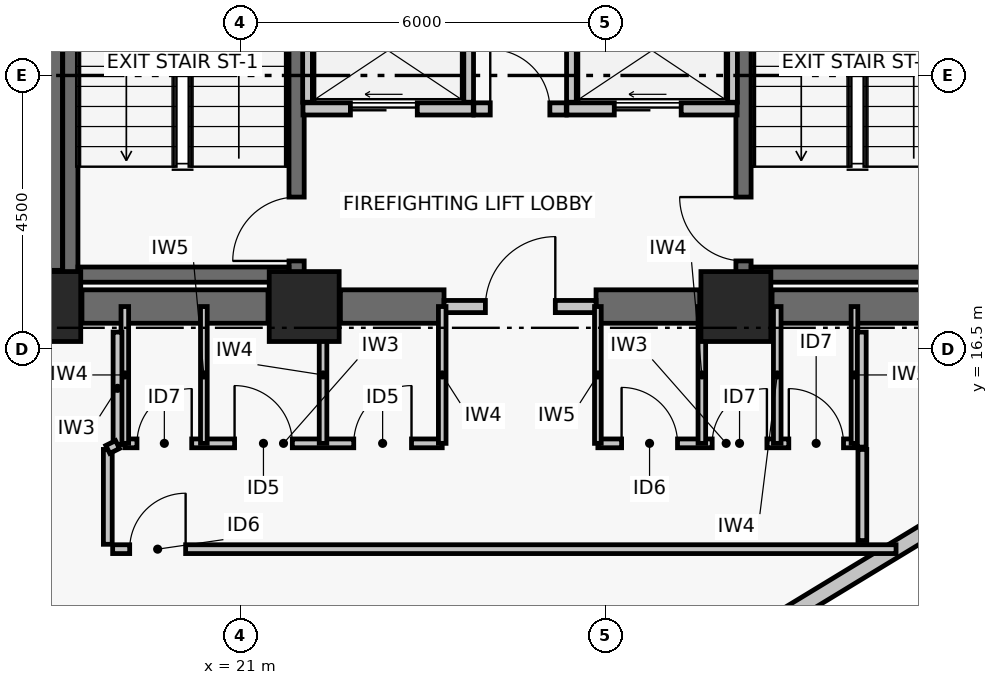
"""IFC4 building model, lengths in metres.
Left out: names, types, materials, properties, quantities, classifications, styles, units other than length and angle.
Written with IfcOpenShell. Run it as: python <this file> out.ifc"""

import sys

from ifc_helpers import new_model, si_unit, direction, frame, frame_2d, origin, origin_2d, place, context, subcontext, project, spatial, rectangle, extrude, element, fill, save


model = new_model("IFC4")
c1 = context("Model", 3, precision=1e-05, world=origin(), true_north=direction((0.0, 1.0)))
c2 = subcontext(c1, "Body", "Model", "MODEL_VIEW")
j1 = project(units=[si_unit("LENGTHUNIT", "METRE"), si_unit("PLANEANGLEUNIT", "RADIAN")], contexts=[c1])
p1 = place(None, origin())
s1 = spatial("IfcSite", under=j1, at=p1, CompositionType="ELEMENT")
p2 = place(p1, origin())
s2 = spatial("IfcBuilding", under=s1, at=p2, CompositionType="ELEMENT")
p3 = place(p2, frame((0.0, 0.0, 103.98)))
s3 = spatial("IfcBuildingStorey", under=s2, at=p3, CompositionType="ELEMENT", Elevation=103.98)
for number, where, z_axis, x_axis in (
    (1, (17.8, 17.2, 0.0), (0.0, 0.0, 1.0), (1.0, 0.0, 0.0)),
    (2, (22.05, 17.2, 0.0), (0.0, 0.0, 1.0), (1.0, 0.0, 0.0)),
    (3, (29.15, 17.2, 0.0), (0.0, 0.0, 1.0), (1.0, 0.0, 0.0)),
):
    element("IfcColumn", number, at=place(p3, frame(where, z_axis=z_axis, x_axis=x_axis)), inside=s3, PredefinedType="COLUMN", context=c2, shape_type="SweptSolid", body=[
        extrude(rectangle(XDim=1.15, YDim=1.15, at=origin_2d()), origin(), (0.0, 0.0, 1.0), 3.72),
    ])
p4 = place(p3, frame((18.395, 17.2, 0.0), z_axis=(0.0, 0.0, 1.0), x_axis=(1.0, 0.0, 0.0)))
e4 = element("IfcWall", 4, at=p4, inside=s3, PredefinedType="SHEAR", context=c2, shape_type="SweptSolid", body=[
    extrude(rectangle(XDim=3.06, YDim=0.55, at=frame_2d((1.53, 0.0))), origin(), (0.0, 0.0, 1.0), 3.47),
])
p5 = place(p3, frame((22.645, 17.2, 0.0), z_axis=(0.0, 0.0, 1.0), x_axis=(1.0, 0.0, 0.0)))
e5 = element("IfcWall", 5, at=p5, inside=s3, PredefinedType="SHEAR", context=c2, shape_type="SweptSolid", body=[
    extrude(rectangle(XDim=1.705, YDim=0.55, at=frame_2d((0.853, 0.0))), origin(), (0.0, 0.0, 1.0), 3.47),
])
p6 = place(p3, frame((26.85, 17.2, 0.0), z_axis=(0.0, 0.0, 1.0), x_axis=(1.0, 0.0, 0.0)))
e6 = element("IfcWall", 6, at=p6, inside=s3, PredefinedType="SHEAR", context=c2, shape_type="SweptSolid", body=[
    extrude(rectangle(XDim=1.705, YDim=0.55, at=frame_2d((0.853, 0.0))), origin(), (0.0, 0.0, 1.0), 3.47),
])
p7 = place(p3, frame((29.745, 17.2, 0.0), z_axis=(0.0, 0.0, 1.0), x_axis=(1.0, 0.0, 0.0)))
e7 = element("IfcWall", 7, at=p7, inside=s3, PredefinedType="SHEAR", context=c2, shape_type="SweptSolid", body=[
    extrude(rectangle(XDim=3.06, YDim=0.55, at=frame_2d((1.53, 0.0))), origin(), (0.0, 0.0, 1.0), 3.47),
])
p8 = place(p3, frame((17.8, 17.795, 0.0), z_axis=(0.0, 0.0, 1.0), x_axis=(0.0, 1.0, 0.0)))
e8 = element("IfcWall", 8, at=p8, inside=s3, PredefinedType="SHEAR", context=c2, shape_type="SweptSolid", body=[
    extrude(rectangle(XDim=8.41, YDim=0.55, at=frame_2d((4.205, 0.0))), origin(), (0.0, 0.0, 1.0), 3.47),
])
p9 = place(p3, frame((18.204, 17.6, 0.0), z_axis=(0.0, 0.0, 1.0), x_axis=(0.0, 1.0, 0.0)))
e9 = element("IfcWall", 9, at=p9, inside=s3, PredefinedType="SHEAR", context=c2, shape_type="SweptSolid", body=[
    extrude(rectangle(XDim=8.8, YDim=0.25, at=frame_2d((4.4, 0.0))), origin(), (0.0, 0.0, 1.0), 3.47),
])
p10 = place(p3, frame((21.925, 17.6, 0.0), z_axis=(0.0, 0.0, 1.0), x_axis=(0.0, 1.0, 0.0)))
e10 = element("IfcWall", 10, at=p10, inside=s3, PredefinedType="SHEAR", context=c2, shape_type="SweptSolid", body=[
    extrude(rectangle(XDim=8.8, YDim=0.25, at=frame_2d((4.4, 0.0))), origin(), (0.0, 0.0, 1.0), 3.47),
])
p11 = place(p10, frame((0.35, 0.0, 0.0)))
e11 = element("IfcOpeningElement", 11, at=p11, cuts=e10, PredefinedType="OPENING", context=c2, shape_type="SweptSolid", body=[
    extrude(rectangle(XDim=1.05, YDim=2.08, at=frame_2d((0.525, 1.04))), frame((0.0, 0.135, 0.0), z_axis=(0.0, -1.0, 0.0), x_axis=(1.0, 0.0, 0.0)), (0.0, 0.0, 1.0), 0.27),
])
p12 = place(p3, frame((18.329, 17.725, 0.0), z_axis=(0.0, 0.0, 1.0), x_axis=(1.0, 0.0, 0.0)))
e12 = element("IfcWall", 12, at=p12, inside=s3, PredefinedType="SHEAR", context=c2, shape_type="SweptSolid", body=[
    extrude(rectangle(XDim=3.471, YDim=0.25, at=frame_2d((1.735, 0.0))), origin(), (0.0, 0.0, 1.0), 3.47),
])
p13 = place(p3, frame((29.275, 17.6, 0.0), z_axis=(0.0, 0.0, 1.0), x_axis=(0.0, 1.0, 0.0)))
e13 = element("IfcWall", 13, at=p13, inside=s3, PredefinedType="SHEAR", context=c2, shape_type="SweptSolid", body=[
    extrude(rectangle(XDim=8.8, YDim=0.25, at=frame_2d((4.4, 0.0))), origin(), (0.0, 0.0, 1.0), 3.47),
])
p14 = place(p13, frame((0.35, 0.0, 0.0)))
e14 = element("IfcOpeningElement", 14, at=p14, cuts=e13, PredefinedType="OPENING", context=c2, shape_type="SweptSolid", body=[
    extrude(rectangle(XDim=1.05, YDim=2.08, at=frame_2d((0.525, 1.04))), frame((0.0, 0.135, 0.0), z_axis=(0.0, -1.0, 0.0), x_axis=(1.0, 0.0, 0.0)), (0.0, 0.0, 1.0), 0.27),
])
p15 = place(p3, frame((29.4, 17.725, 0.0), z_axis=(0.0, 0.0, 1.0), x_axis=(1.0, 0.0, 0.0)))
e15 = element("IfcWall", 15, at=p15, inside=s3, PredefinedType="SHEAR", context=c2, shape_type="SweptSolid", body=[
    extrude(rectangle(XDim=3.471, YDim=0.25, at=frame_2d((1.736, 0.0))), origin(), (0.0, 0.0, 1.0), 3.47),
])
p16 = place(p3, frame((35.48, 15.455, 0.0), z_axis=(0.0, 0.0, 1.0), x_axis=(-0.854673977685, -0.51916509115, 0.0)))
e16 = element("IfcWall", 16, at=p16, inside=s3, PredefinedType="PARTITIONING", context=c2, shape_type="SweptSolid", body=[
    extrude(rectangle(XDim=6.678, YDim=0.26, at=frame_2d((3.339, 0.0))), origin(), (0.0, 0.0, 1.0), 3.47),
])
p17 = place(p3, frame((24.35, 17.2, 0.0), z_axis=(0.0, 0.0, 1.0), x_axis=(1.0, 0.0, 0.0)))
e17 = element("IfcWall", 17, at=p17, inside=s3, PredefinedType="PARTITIONING", context=c2, shape_type="SweptSolid", body=[
    extrude(rectangle(XDim=2.5, YDim=0.2, at=frame_2d((1.25, 0.0))), origin(), (0.0, 0.0, 1.0), 2.6),
])
p18 = place(p17, frame((0.68, 0.0, 0.0)))
e18 = element("IfcOpeningElement", 18, at=p18, cuts=e17, PredefinedType="OPENING", context=c2, shape_type="SweptSolid", body=[
    extrude(rectangle(XDim=1.15, YDim=2.08, at=frame_2d((0.575, 1.04))), frame((0.0, 0.11, 0.0), z_axis=(0.0, -1.0, 0.0), x_axis=(1.0, 0.0, 0.0)), (0.0, 0.0, 1.0), 0.22),
])
p19 = place(p3, frame((24.84, 20.45, 0.0), z_axis=(0.0, 0.0, 1.0), x_axis=(1.0, 0.0, 0.0)))
e19 = element("IfcWall", 19, at=p19, inside=s3, PredefinedType="PARTITIONING", context=c2, shape_type="SweptSolid", body=[
    extrude(rectangle(XDim=1.52, YDim=0.2, at=frame_2d((0.76, 0.0))), origin(), (0.0, 0.0, 1.0), 3.47),
])
p20 = place(p19, frame((0.27, 0.0, 0.0)))
e20 = element("IfcOpeningElement", 20, at=p20, cuts=e19, PredefinedType="OPENING", context=c2, shape_type="SweptSolid", body=[
    extrude(rectangle(XDim=0.98, YDim=2.06, at=frame_2d((0.49, 1.03))), frame((0.0, 0.11, 0.0), z_axis=(0.0, -1.0, 0.0), x_axis=(1.0, 0.0, 0.0)), (0.0, 0.0, 1.0), 0.22),
])
p21 = place(p3, frame((22.03, 20.45, 0.0), z_axis=(0.0, 0.0, 1.0), x_axis=(1.0, 0.0, 0.0)))
e21 = element("IfcWall", 21, at=p21, inside=s3, PredefinedType="PARTITIONING", context=c2, shape_type="SweptSolid", body=[
    extrude(rectangle(XDim=2.8, YDim=0.2, at=frame_2d((1.4, 0.0))), origin(), (0.0, 0.0, 1.0), 3.47),
])
p22 = place(p21, frame((0.78, 0.0, 0.0)))
e22 = element("IfcOpeningElement", 22, at=p22, cuts=e21, PredefinedType="OPENING", context=c2, shape_type="SweptSolid", body=[
    extrude(rectangle(XDim=1.1, YDim=2.08, at=frame_2d((0.55, 1.04))), frame((0.0, 0.11, 0.0), z_axis=(0.0, -1.0, 0.0), x_axis=(1.0, 0.0, 0.0)), (0.0, 0.0, 1.0), 0.22),
])
p23 = place(p3, frame((26.37, 20.45, 0.0), z_axis=(0.0, 0.0, 1.0), x_axis=(1.0, 0.0, 0.0)))
e23 = element("IfcWall", 23, at=p23, inside=s3, PredefinedType="PARTITIONING", context=c2, shape_type="SweptSolid", body=[
    extrude(rectangle(XDim=2.8, YDim=0.2, at=frame_2d((1.4, 0.0))), origin(), (0.0, 0.0, 1.0), 3.47),
])
p24 = place(p23, frame((0.78, 0.0, 0.0)))
e24 = element("IfcOpeningElement", 24, at=p24, cuts=e23, PredefinedType="OPENING", context=c2, shape_type="SweptSolid", body=[
    extrude(rectangle(XDim=1.1, YDim=2.08, at=frame_2d((0.55, 1.04))), frame((0.0, 0.11, 0.0), z_axis=(0.0, -1.0, 0.0), x_axis=(1.0, 0.0, 0.0)), (0.0, 0.0, 1.0), 0.22),
])
p25 = place(p3, frame((22.105, 20.56, 0.0), z_axis=(0.0, 0.0, 1.0), x_axis=(0.0, 1.0, 0.0)))
e25 = element("IfcWall", 25, at=p25, inside=s3, PredefinedType="PARTITIONING", context=c2, shape_type="SweptSolid", body=[
    extrude(rectangle(XDim=5.45, YDim=0.16, at=frame_2d((2.725, 0.0))), origin(), (0.0, 0.0, 1.0), 3.47),
])
p26 = place(p3, frame((24.755, 20.56, 0.0), z_axis=(0.0, 0.0, 1.0), x_axis=(0.0, 1.0, 0.0)))
e26 = element("IfcWall", 26, at=p26, inside=s3, PredefinedType="PARTITIONING", context=c2, shape_type="SweptSolid", body=[
    extrude(rectangle(XDim=1.71, YDim=0.16, at=frame_2d((0.855, 0.0))), origin(), (0.0, 0.0, 1.0), 3.47),
])
p27 = place(p3, frame((29.095, 20.56, 0.0), z_axis=(0.0, 0.0, 1.0), x_axis=(0.0, 1.0, 0.0)))
e27 = element("IfcWall", 27, at=p27, inside=s3, PredefinedType="PARTITIONING", context=c2, shape_type="SweptSolid", body=[
    extrude(rectangle(XDim=5.45, YDim=0.16, at=frame_2d((2.725, 0.0))), origin(), (0.0, 0.0, 1.0), 3.47),
])
p28 = place(p3, frame((26.445, 20.56, 0.0), z_axis=(0.0, 0.0, 1.0), x_axis=(0.0, 1.0, 0.0)))
e28 = element("IfcWall", 28, at=p28, inside=s3, PredefinedType="PARTITIONING", context=c2, shape_type="SweptSolid", body=[
    extrude(rectangle(XDim=1.71, YDim=0.16, at=frame_2d((0.855, 0.0))), origin(), (0.0, 0.0, 1.0), 3.47),
])
p29 = place(p3, frame((19.1, 14.95, 0.0), z_axis=(0.0, 0.0, 1.0), x_axis=(1.0, 0.0, 0.0)))
e29 = element("IfcWall", 29, at=p29, inside=s3, PredefinedType="PARTITIONING", context=c2, shape_type="SweptSolid", body=[
    extrude(rectangle(XDim=5.22, YDim=0.145, at=frame_2d((2.61, 0.0))), origin(), (0.0, 0.0, 1.0), 2.65),
])
p30 = place(p29, frame((0.2, 0.0, 0.0)))
e30 = element("IfcOpeningElement", 30, at=p30, cuts=e29, PredefinedType="OPENING", context=c2, shape_type="SweptSolid", body=[
    extrude(rectangle(XDim=0.9, YDim=2.02, at=frame_2d((0.45, 1.01))), frame((0.0, 0.083, 0.0), z_axis=(0.0, -1.0, 0.0), x_axis=(1.0, 0.0, 0.0)), (0.0, 0.0, 1.0), 0.165),
])
p31 = place(p29, frame((1.805, 0.0, 0.0)))
e31 = element("IfcOpeningElement", 31, at=p31, cuts=e29, PredefinedType="OPENING", context=c2, shape_type="SweptSolid", body=[
    extrude(rectangle(XDim=0.95, YDim=2.06, at=frame_2d((0.475, 1.03))), frame((0.0, 0.083, 0.0), z_axis=(0.0, -1.0, 0.0), x_axis=(1.0, 0.0, 0.0)), (0.0, 0.0, 1.0), 0.165),
])
p32 = place(p29, frame((3.765, 0.0, 0.0)))
e32 = element("IfcOpeningElement", 32, at=p32, cuts=e29, PredefinedType="OPENING", context=c2, shape_type="SweptSolid", body=[
    extrude(rectangle(XDim=0.95, YDim=2.06, at=frame_2d((0.475, 1.03))), frame((0.0, 0.083, 0.0), z_axis=(0.0, -1.0, 0.0), x_axis=(1.0, 0.0, 0.0)), (0.0, 0.0, 1.0), 0.165),
])
p33 = place(p3, frame((26.88, 14.95, 0.0), z_axis=(0.0, 0.0, 1.0), x_axis=(1.0, 0.0, 0.0)))
e33 = element("IfcWall", 33, at=p33, inside=s3, PredefinedType="PARTITIONING", context=c2, shape_type="SweptSolid", body=[
    extrude(rectangle(XDim=4.22, YDim=0.145, at=frame_2d((2.11, 0.0))), origin(), (0.0, 0.0, 1.0), 3.05),
])
p34 = place(p33, frame((0.39, 0.0, 0.0)))
e34 = element("IfcOpeningElement", 34, at=p34, cuts=e33, PredefinedType="OPENING", context=c2, shape_type="SweptSolid", body=[
    extrude(rectangle(XDim=0.92, YDim=2.05, at=frame_2d((0.46, 1.025))), frame((0.0, 0.083, 0.0), z_axis=(0.0, -1.0, 0.0), x_axis=(1.0, 0.0, 0.0)), (0.0, 0.0, 1.0), 0.165),
])
p35 = place(p33, frame((1.88, 0.0, 0.0)))
e35 = element("IfcOpeningElement", 35, at=p35, cuts=e33, PredefinedType="OPENING", context=c2, shape_type="SweptSolid", body=[
    extrude(rectangle(XDim=0.9, YDim=2.02, at=frame_2d((0.45, 1.01))), frame((0.0, 0.083, 0.0), z_axis=(0.0, -1.0, 0.0), x_axis=(1.0, 0.0, 0.0)), (0.0, 0.0, 1.0), 0.165),
])
p36 = place(p33, frame((3.14, 0.0, 0.0)))
e36 = element("IfcOpeningElement", 36, at=p36, cuts=e33, PredefinedType="OPENING", context=c2, shape_type="SweptSolid", body=[
    extrude(rectangle(XDim=0.9, YDim=2.02, at=frame_2d((0.45, 1.01))), frame((0.0, 0.083, 0.0), z_axis=(0.0, -1.0, 0.0), x_axis=(1.0, 0.0, 0.0)), (0.0, 0.0, 1.0), 0.165),
])
p37 = place(p3, frame((19.1, 14.95, 0.0), z_axis=(0.0, 0.0, 1.0), x_axis=(0.0, 1.0, 0.0)))
e37 = element("IfcWall", 37, at=p37, inside=s3, PredefinedType="PARTITIONING", context=c2, shape_type="SweptSolid", body=[
    extrude(rectangle(XDim=2.25, YDim=0.125, at=frame_2d((1.125, 0.0))), origin(), (0.0, 0.0, 1.0), 2.6),
])
p38 = place(p3, frame((20.4, 14.95, 0.0), z_axis=(0.0, 0.0, 1.0), x_axis=(0.0, 1.0, 0.0)))
e38 = element("IfcWall", 38, at=p38, inside=s3, PredefinedType="PARTITIONING", context=c2, shape_type="SweptSolid", body=[
    extrude(rectangle(XDim=2.25, YDim=0.11, at=frame_2d((1.125, 0.0))), origin(), (0.0, 0.0, 1.0), 2.6),
])
for number, where, z_axis, x_axis in (
    (39, (22.36, 14.95, 0.0), (0.0, 0.0, 1.0), (0.0, 1.0, 0.0)),
    (40, (24.32, 14.95, 0.0), (0.0, 0.0, 1.0), (0.0, 1.0, 0.0)),
):
    element("IfcWall", number, at=place(p3, frame(where, z_axis=z_axis, x_axis=x_axis)), inside=s3, PredefinedType="PARTITIONING", context=c2, shape_type="SweptSolid", body=[
        extrude(rectangle(XDim=2.25, YDim=0.125, at=frame_2d((1.125, 0.0))), origin(), (0.0, 0.0, 1.0), 2.6),
    ])
p39 = place(p3, frame((26.88, 14.95, 0.0), z_axis=(0.0, 0.0, 1.0), x_axis=(0.0, 1.0, 0.0)))
e41 = element("IfcWall", 41, at=p39, inside=s3, PredefinedType="PARTITIONING", context=c2, shape_type="SweptSolid", body=[
    extrude(rectangle(XDim=2.25, YDim=0.11, at=frame_2d((1.125, 0.0))), origin(), (0.0, 0.0, 1.0), 2.6),
])
for number, where, z_axis, x_axis in (
    (42, (28.59, 14.95, 0.0), (0.0, 0.0, 1.0), (0.0, 1.0, 0.0)),
    (43, (29.83, 14.95, 0.0), (0.0, 0.0, 1.0), (0.0, 1.0, 0.0)),
):
    element("IfcWall", number, at=place(p3, frame(where, z_axis=z_axis, x_axis=x_axis)), inside=s3, PredefinedType="PARTITIONING", context=c2, shape_type="SweptSolid", body=[
        extrude(rectangle(XDim=2.25, YDim=0.125, at=frame_2d((1.125, 0.0))), origin(), (0.0, 0.0, 1.0), 2.6),
    ])
p40 = place(p3, frame((31.1, 14.95, 0.0), z_axis=(0.0, 0.0, 1.0), x_axis=(0.0, 1.0, 0.0)))
e44 = element("IfcWall", 44, at=p40, inside=s3, PredefinedType="PARTITIONING", context=c2, shape_type="SweptSolid", body=[
    extrude(rectangle(XDim=2.25, YDim=0.11, at=frame_2d((1.125, 0.0))), origin(), (0.0, 0.0, 1.0), 2.6),
])
p41 = place(p3, frame((18.98, 16.78, 0.0), z_axis=(0.0, 0.0, 1.0), x_axis=(0.0, -1.0, 0.0)))
e45 = element("IfcWall", 45, at=p41, inside=s3, PredefinedType="PARTITIONING", context=c2, shape_type="SweptSolid", body=[
    extrude(rectangle(XDim=1.85, YDim=0.145, at=frame_2d((0.925, 0.0))), origin(), (0.0, 0.0, 1.0), 2.6),
])
p42 = place(p3, frame((18.82, 14.85, 0.0), z_axis=(0.0, 0.0, 1.0), x_axis=(0.0, -1.0, 0.0)))
e46 = element("IfcWall", 46, at=p42, inside=s3, PredefinedType="PARTITIONING", context=c2, shape_type="SweptSolid", body=[
    extrude(rectangle(XDim=1.56, YDim=0.145, at=frame_2d((0.78, 0.0))), origin(), (0.0, 0.0, 1.0), 3.05),
])
p43 = place(p3, frame((18.9, 13.21, 0.0), z_axis=(0.0, 0.0, 1.0), x_axis=(1.0, 0.0, 0.0)))
e47 = element("IfcWall", 47, at=p43, inside=s3, PredefinedType="PARTITIONING", context=c2, shape_type="SweptSolid", body=[
    extrude(rectangle(XDim=12.884, YDim=0.145, at=frame_2d((6.442, 0.0))), origin(), (0.0, 0.0, 1.0), 2.65),
])
p44 = place(p43, frame((0.28, 0.0, 0.0)))
e48 = element("IfcOpeningElement", 48, at=p44, cuts=e47, PredefinedType="OPENING", context=c2, shape_type="SweptSolid", body=[
    extrude(rectangle(XDim=0.92, YDim=2.05, at=frame_2d((0.46, 1.025))), frame((0.0, 0.083, 0.0), z_axis=(0.0, -1.0, 0.0), x_axis=(1.0, 0.0, 0.0)), (0.0, 0.0, 1.0), 0.165),
])
p45 = place(p3, frame((31.23, 13.351, 0.0), z_axis=(0.0, 0.0, 1.0), x_axis=(0.0, 1.0, 0.0)))
e49 = element("IfcWall", 49, at=p45, inside=s3, PredefinedType="PARTITIONING", context=c2, shape_type="SweptSolid", body=[
    extrude(rectangle(XDim=1.499, YDim=0.145, at=frame_2d((0.75, 0.0))), origin(), (0.0, 0.0, 1.0), 2.9),
])
p46 = place(p3, frame((31.22, 14.889, 0.0), z_axis=(0.0, 0.0, 1.0), x_axis=(0.0, 1.0, 0.0)))
e50 = element("IfcWall", 50, at=p46, inside=s3, PredefinedType="PARTITIONING", context=c2, shape_type="SweptSolid", body=[
    extrude(rectangle(XDim=1.891, YDim=0.145, at=frame_2d((0.946, 0.0))), origin(), (0.0, 0.0, 1.0), 2.6),
])
p47 = place(p3, frame((18.82, 14.85, 0.0), z_axis=(0.0, 0.0, 1.0), x_axis=(0.89470021502, 0.446667130247, 0.0)))
e51 = element("IfcWall", 51, at=p47, inside=s3, PredefinedType="PARTITIONING", context=c2, shape_type="SweptSolid", body=[
    extrude(rectangle(XDim=0.179, YDim=0.145, at=frame_2d((0.089, 0.0))), origin(), (0.0, 0.0, 1.0), 3.47),
])
p48 = place(p11, origin())
e52 = element("IfcDoor", 52, at=p48, inside=s3, OperationType="SINGLE_SWING_LEFT", PredefinedType="DOOR", context=c2, shape_type="SweptSolid", body=[
    extrude(rectangle(XDim=1.05, YDim=2.08, at=frame_2d((0.525, 1.04))), frame((0.0, 0.025, 0.0), z_axis=(0.0, -1.0, 0.0), x_axis=(1.0, 0.0, 0.0)), (0.0, 0.0, 1.0), 0.05),
])
fill(e11, e52)
p49 = place(p14, origin())
e53 = element("IfcDoor", 53, at=p49, inside=s3, OperationType="SINGLE_SWING_RIGHT", PredefinedType="DOOR", context=c2, shape_type="SweptSolid", body=[
    extrude(rectangle(XDim=1.05, YDim=2.08, at=frame_2d((0.525, 1.04))), frame((0.0, 0.025, 0.0), z_axis=(0.0, -1.0, 0.0), x_axis=(1.0, 0.0, 0.0)), (0.0, 0.0, 1.0), 0.05),
])
fill(e14, e53)
p50 = place(p18, origin())
e54 = element("IfcDoor", 54, at=p50, inside=s3, OperationType="SINGLE_SWING_RIGHT", PredefinedType="DOOR", context=c2, shape_type="SweptSolid", body=[
    extrude(rectangle(XDim=1.15, YDim=2.08, at=frame_2d((0.575, 1.04))), frame((0.0, 0.025, 0.0), z_axis=(0.0, -1.0, 0.0), x_axis=(1.0, 0.0, 0.0)), (0.0, 0.0, 1.0), 0.05),
])
fill(e18, e54)
p51 = place(p20, origin())
e55 = element("IfcDoor", 55, at=p51, inside=s3, OperationType="SINGLE_SWING_LEFT", PredefinedType="DOOR", context=c2, shape_type="SweptSolid", body=[
    extrude(rectangle(XDim=0.98, YDim=2.06, at=frame_2d((0.49, 1.03))), frame((0.0, 0.025, 0.0), z_axis=(0.0, -1.0, 0.0), x_axis=(1.0, 0.0, 0.0)), (0.0, 0.0, 1.0), 0.05),
])
fill(e20, e55)
p52 = place(p22, origin())
e56 = element("IfcDoor", 56, at=p52, inside=s3, OperationType="DOUBLE_DOOR_SLIDING", PredefinedType="DOOR", context=c2, shape_type="SweptSolid", body=[
    extrude(rectangle(XDim=1.1, YDim=2.08, at=frame_2d((0.55, 1.04))), frame((0.0, 0.025, 0.0), z_axis=(0.0, -1.0, 0.0), x_axis=(1.0, 0.0, 0.0)), (0.0, 0.0, 1.0), 0.05),
])
fill(e22, e56)
p53 = place(p24, origin())
e57 = element("IfcDoor", 57, at=p53, inside=s3, OperationType="DOUBLE_DOOR_SLIDING", PredefinedType="DOOR", context=c2, shape_type="SweptSolid", body=[
    extrude(rectangle(XDim=1.1, YDim=2.08, at=frame_2d((0.55, 1.04))), frame((0.0, 0.025, 0.0), z_axis=(0.0, -1.0, 0.0), x_axis=(1.0, 0.0, 0.0)), (0.0, 0.0, 1.0), 0.05),
])
fill(e24, e57)
p54 = place(p30, origin())
e58 = element("IfcDoor", 58, at=p54, inside=s3, OperationType="SINGLE_SWING_RIGHT", PredefinedType="DOOR", context=c2, shape_type="SweptSolid", body=[
    extrude(rectangle(XDim=0.9, YDim=2.02, at=frame_2d((0.45, 1.01))), frame((0.0, 0.025, 0.0), z_axis=(0.0, -1.0, 0.0), x_axis=(1.0, 0.0, 0.0)), (0.0, 0.0, 1.0), 0.05),
])
fill(e30, e58)
p55 = place(p31, origin())
e59 = element("IfcDoor", 59, at=p55, inside=s3, OperationType="SINGLE_SWING_LEFT", PredefinedType="DOOR", context=c2, shape_type="SweptSolid", body=[
    extrude(rectangle(XDim=0.95, YDim=2.06, at=frame_2d((0.475, 1.03))), frame((0.0, 0.025, 0.0), z_axis=(0.0, -1.0, 0.0), x_axis=(1.0, 0.0, 0.0)), (0.0, 0.0, 1.0), 0.05),
])
fill(e31, e59)
p56 = place(p32, origin())
e60 = element("IfcDoor", 60, at=p56, inside=s3, OperationType="SINGLE_SWING_RIGHT", PredefinedType="DOOR", context=c2, shape_type="SweptSolid", body=[
    extrude(rectangle(XDim=0.95, YDim=2.06, at=frame_2d((0.475, 1.03))), frame((0.0, 0.025, 0.0), z_axis=(0.0, -1.0, 0.0), x_axis=(1.0, 0.0, 0.0)), (0.0, 0.0, 1.0), 0.05),
])
fill(e32, e60)
p57 = place(p34, origin())
e61 = element("IfcDoor", 61, at=p57, inside=s3, OperationType="SINGLE_SWING_LEFT", PredefinedType="DOOR", context=c2, shape_type="SweptSolid", body=[
    extrude(rectangle(XDim=0.92, YDim=2.05, at=frame_2d((0.46, 1.025))), frame((0.0, 0.025, 0.0), z_axis=(0.0, -1.0, 0.0), x_axis=(1.0, 0.0, 0.0)), (0.0, 0.0, 1.0), 0.05),
])
fill(e34, e61)
p58 = place(p35, origin())
e62 = element("IfcDoor", 62, at=p58, inside=s3, OperationType="SINGLE_SWING_RIGHT", PredefinedType="DOOR", context=c2, shape_type="SweptSolid", body=[
    extrude(rectangle(XDim=0.9, YDim=2.02, at=frame_2d((0.45, 1.01))), frame((0.0, 0.025, 0.0), z_axis=(0.0, -1.0, 0.0), x_axis=(1.0, 0.0, 0.0)), (0.0, 0.0, 1.0), 0.05),
])
fill(e35, e62)
p59 = place(p36, origin())
e63 = element("IfcDoor", 63, at=p59, inside=s3, OperationType="SINGLE_SWING_LEFT", PredefinedType="DOOR", context=c2, shape_type="SweptSolid", body=[
    extrude(rectangle(XDim=0.9, YDim=2.02, at=frame_2d((0.45, 1.01))), frame((0.0, 0.025, 0.0), z_axis=(0.0, -1.0, 0.0), x_axis=(1.0, 0.0, 0.0)), (0.0, 0.0, 1.0), 0.05),
])
fill(e36, e63)
p60 = place(p44, origin())
e64 = element("IfcDoor", 64, at=p60, inside=s3, OperationType="SINGLE_SWING_RIGHT", PredefinedType="DOOR", context=c2, shape_type="SweptSolid", body=[
    extrude(rectangle(XDim=0.92, YDim=2.05, at=frame_2d((0.46, 1.025))), frame((0.0, 0.025, 0.0), z_axis=(0.0, -1.0, 0.0), x_axis=(1.0, 0.0, 0.0)), (0.0, 0.0, 1.0), 0.05),
])
fill(e48, e64)
save(model, sys.argv[1])
